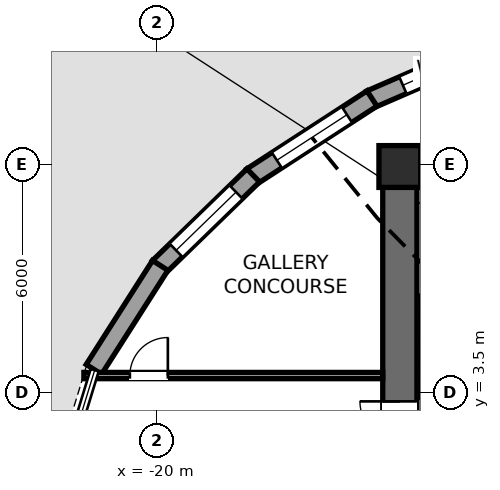
"""IFC4 building model, lengths in metres.
Left out: names, types, materials, properties, quantities, classifications, styles, units other than length and angle.
Written with IfcOpenShell. Run it as: python <this file> out.ifc"""

import sys

from ifc_helpers import new_model, si_unit, direction, frame, frame_2d, origin, origin_2d, place, context, subcontext, project, spatial, rectangle, extrude, element, fill, save


model = new_model("IFC4")
c1 = context("Model", 3, precision=1e-05, world=origin(), true_north=direction((0.0, 1.0)))
c2 = subcontext(c1, "Body", "Model", "MODEL_VIEW")
j1 = project(units=[si_unit("LENGTHUNIT", "METRE"), si_unit("PLANEANGLEUNIT", "RADIAN")], contexts=[c1])
p1 = place(None, origin())
s1 = spatial("IfcSite", under=j1, at=p1, CompositionType="ELEMENT")
p2 = place(p1, origin())
s2 = spatial("IfcBuilding", under=s1, at=p2, CompositionType="ELEMENT")
p3 = place(p2, origin())
s3 = spatial("IfcBuildingStorey", under=s2, at=p3, CompositionType="ELEMENT", Elevation=0.0)
p4 = place(p3, frame((-13.6, 0.95, 0.0), z_axis=(0.0, 0.0, 1.0), x_axis=(0.0, 1.0, 0.0)))
e1 = element("IfcWall", 1, at=p4, inside=s3, PredefinedType="SHEAR", context=c2, shape_type="SweptSolid", body=[
    extrude(rectangle(XDim=8.95, YDim=0.9, at=frame_2d((4.475, 0.0))), origin(), (0.0, 0.0, 1.0), 6.0),
])
p5 = place(p4, frame((1.27, 0.0, 0.0)))
e2 = element("IfcOpeningElement", 2, at=p5, cuts=e1, PredefinedType="OPENING", context=c2, shape_type="SweptSolid", body=[
    extrude(rectangle(XDim=1.05, YDim=2.15, at=frame_2d((0.525, 1.075))), frame((0.0, 0.46, 0.0), z_axis=(0.0, -1.0, 0.0), x_axis=(1.0, 0.0, 0.0)), (0.0, 0.0, 1.0), 0.92),
])
p6 = place(p3, frame((-14.05, 9.45, 0.0), z_axis=(0.0, 0.0, 1.0), x_axis=(1.0, 0.0, 0.0)))
e3 = element("IfcWall", 3, at=p6, inside=s3, PredefinedType="SHEAR", context=c2, shape_type="SweptSolid", body=[
    extrude(rectangle(XDim=9.7, YDim=0.9, at=frame_2d((4.85, 0.0))), origin(), (0.0, 0.0, 1.0), 6.0),
])
p7 = place(p3, frame((-13.6, 9.45, 0.0), z_axis=(0.0, 0.0, 1.0), x_axis=(1.0, 0.0, 0.0)))
e4 = element("IfcColumn", 4, at=p7, inside=s3, PredefinedType="COLUMN", context=c2, shape_type="SweptSolid", body=[
    extrude(rectangle(XDim=1.1, YDim=1.1, at=origin_2d()), origin(), (0.0, 0.0, 1.0), 6.0),
])
p8 = place(p3, frame((-14.369, 11.22, 0.0), z_axis=(0.0, 0.0, 1.0), x_axis=(0.917428047281, 0.3979017191, 0.0)))
e5 = element("IfcWall", 5, at=p8, inside=s3, PredefinedType="STANDARD", context=c2, shape_type="SweptSolid", body=[
    extrude(rectangle(XDim=4.051, YDim=0.48, at=frame_2d((2.025, 0.0))), origin(), (0.0, 0.0, 1.0), 4.913),
])
p9 = place(p8, frame((0.925, 0.0, 0.85)))
e6 = element("IfcOpeningElement", 6, at=p9, cuts=e5, PredefinedType="OPENING", context=c2, shape_type="SweptSolid", body=[
    extrude(rectangle(XDim=2.2, YDim=1.95, at=frame_2d((1.1, 0.975))), frame((0.0, 0.25, 0.0), z_axis=(0.0, -1.0, 0.0), x_axis=(1.0, 0.0, 0.0)), (0.0, 0.0, 1.0), 0.5),
])
p10 = place(p3, frame((-17.494, 9.188, 0.0), z_axis=(0.0, 0.0, 1.0), x_axis=(0.838776546814, 0.544475807098, 0.0)))
e7 = element("IfcWall", 7, at=p10, inside=s3, PredefinedType="STANDARD", context=c2, shape_type="SweptSolid", body=[
    extrude(rectangle(XDim=3.768, YDim=0.48, at=frame_2d((1.884, 0.0))), origin(), (0.0, 0.0, 1.0), 4.913),
])
p11 = place(p10, frame((0.784, 0.0, 0.85)))
e8 = element("IfcOpeningElement", 8, at=p11, cuts=e7, PredefinedType="OPENING", context=c2, shape_type="SweptSolid", body=[
    extrude(rectangle(XDim=2.2, YDim=1.95, at=frame_2d((1.1, 0.975))), frame((0.0, 0.25, 0.0), z_axis=(0.0, -1.0, 0.0), x_axis=(1.0, 0.0, 0.0)), (0.0, 0.0, 1.0), 0.5),
])
p12 = place(p3, frame((-19.941, 6.805, 0.0), z_axis=(0.0, 0.0, 1.0), x_axis=(0.717293479468, 0.696771170696, 0.0)))
e9 = element("IfcWall", 9, at=p12, inside=s3, PredefinedType="STANDARD", context=c2, shape_type="SweptSolid", body=[
    extrude(rectangle(XDim=3.462, YDim=0.48, at=frame_2d((1.731, 0.0))), origin(), (0.0, 0.0, 1.0), 4.913),
])
p13 = place(p12, frame((0.631, 0.0, 0.85)))
e10 = element("IfcOpeningElement", 10, at=p13, cuts=e9, PredefinedType="OPENING", context=c2, shape_type="SweptSolid", body=[
    extrude(rectangle(XDim=2.2, YDim=1.95, at=frame_2d((1.1, 0.975))), frame((0.0, 0.25, 0.0), z_axis=(0.0, -1.0, 0.0), x_axis=(1.0, 0.0, 0.0)), (0.0, 0.0, 1.0), 0.5),
])
p14 = place(p3, frame((-21.651, 4.112, 0.0), z_axis=(0.0, 0.0, 1.0), x_axis=(0.537902363654, 0.843007145388, 0.0)))
e11 = element("IfcWall", 11, at=p14, inside=s3, PredefinedType="STANDARD", context=c2, shape_type="SweptSolid", body=[
    extrude(rectangle(XDim=3.245, YDim=0.48, at=frame_2d((1.623, 0.0))), origin(), (0.0, 0.0, 1.0), 4.913),
])
p15 = place(p3, frame((-21.914, 3.95, 0.0), z_axis=(0.0, 0.0, 1.0), x_axis=(1.0, 0.0, 0.0)))
e12 = element("IfcWall", 12, at=p15, inside=s3, PredefinedType="PARTITIONING", context=c2, shape_type="SweptSolid", body=[
    extrude(rectangle(XDim=7.864, YDim=0.165, at=frame_2d((3.932, 0.0))), origin(), (0.0, 0.0, 1.0), 5.233),
])
p16 = place(p15, frame((1.209, 0.0, 0.0)))
e13 = element("IfcOpeningElement", 13, at=p16, cuts=e12, PredefinedType="OPENING", context=c2, shape_type="SweptSolid", body=[
    extrude(rectangle(XDim=1.0, YDim=2.15, at=frame_2d((0.5, 1.075))), frame((0.0, 0.093, 0.0), z_axis=(0.0, -1.0, 0.0), x_axis=(1.0, 0.0, 0.0)), (0.0, 0.0, 1.0), 0.185),
])
p17 = place(p9, origin())
e14 = element("IfcWindow", 14, at=p17, inside=s3, PartitioningType="SINGLE_PANEL", PredefinedType="WINDOW", context=c2, shape_type="SweptSolid", body=[
    extrude(rectangle(XDim=2.2, YDim=1.95, at=frame_2d((1.1, 0.975))), frame((0.0, -0.01, 0.0), z_axis=(0.0, -1.0, 0.0), x_axis=(1.0, 0.0, 0.0)), (0.0, 0.0, 1.0), 0.06),
])
fill(e6, e14)
p18 = place(p11, origin())
e15 = element("IfcWindow", 15, at=p18, inside=s3, PartitioningType="SINGLE_PANEL", PredefinedType="WINDOW", context=c2, shape_type="SweptSolid", body=[
    extrude(rectangle(XDim=2.2, YDim=1.95, at=frame_2d((1.1, 0.975))), frame((0.0, -0.01, 0.0), z_axis=(0.0, -1.0, 0.0), x_axis=(1.0, 0.0, 0.0)), (0.0, 0.0, 1.0), 0.06),
])
fill(e8, e15)
p19 = place(p13, origin())
e16 = element("IfcWindow", 16, at=p19, inside=s3, PartitioningType="SINGLE_PANEL", PredefinedType="WINDOW", context=c2, shape_type="SweptSolid", body=[
    extrude(rectangle(XDim=2.2, YDim=1.95, at=frame_2d((1.1, 0.975))), frame((0.0, -0.01, 0.0), z_axis=(0.0, -1.0, 0.0), x_axis=(1.0, 0.0, 0.0)), (0.0, 0.0, 1.0), 0.06),
])
fill(e10, e16)
p20 = place(p5, origin())
e17 = element("IfcDoor", 17, at=p20, inside=s3, OperationType="SINGLE_SWING_RIGHT", PredefinedType="DOOR", context=c2, shape_type="SweptSolid", body=[
    extrude(rectangle(XDim=1.05, YDim=2.15, at=frame_2d((0.525, 1.075))), frame((0.0, 0.025, 0.0), z_axis=(0.0, -1.0, 0.0), x_axis=(1.0, 0.0, 0.0)), (0.0, 0.0, 1.0), 0.05),
])
fill(e2, e17)
p21 = place(p16, origin())
e18 = element("IfcDoor", 18, at=p21, inside=s3, OperationType="SINGLE_SWING_RIGHT", PredefinedType="DOOR", context=c2, shape_type="SweptSolid", body=[
    extrude(rectangle(XDim=1.0, YDim=2.15, at=frame_2d((0.5, 1.075))), frame((0.0, 0.025, 0.0), z_axis=(0.0, -1.0, 0.0), x_axis=(1.0, 0.0, 0.0)), (0.0, 0.0, 1.0), 0.05),
])
fill(e13, e18)
save(model, sys.argv[1])
